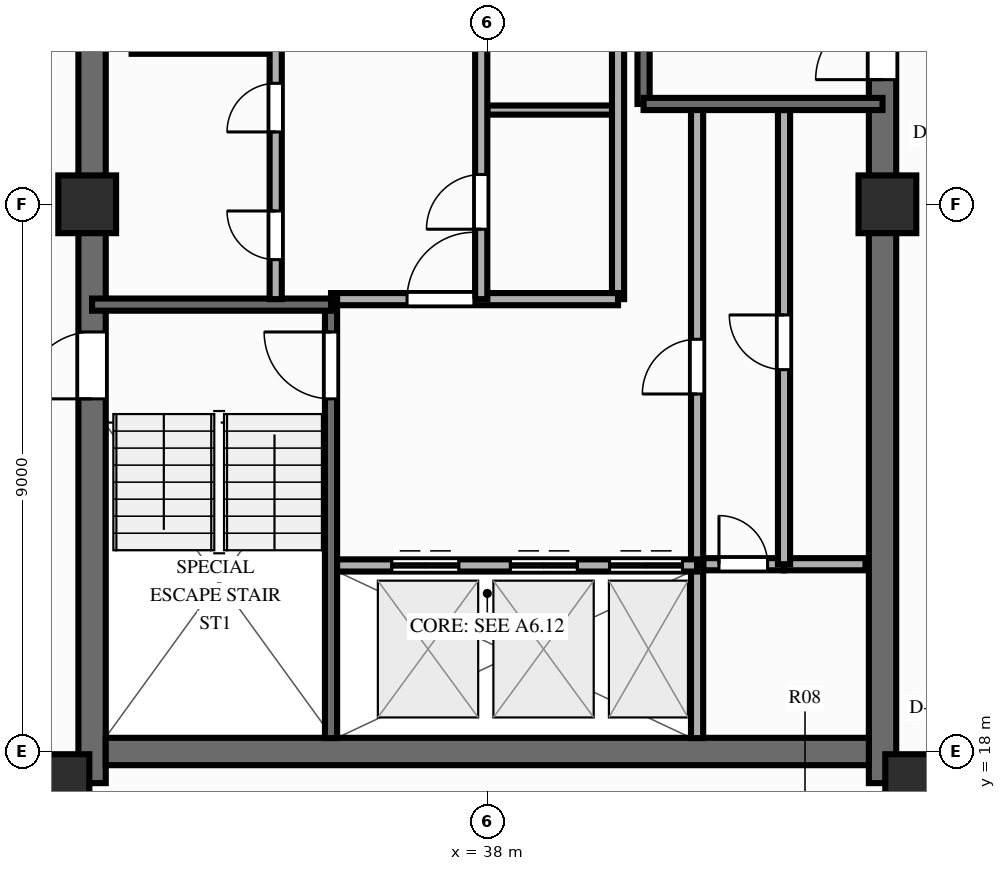
"""IFC4 building model, lengths in metres.
Left out: names, types, materials, properties, quantities, classifications, styles, units other than length and angle.
Written with IfcOpenShell. Run it as: python <this file> out.ifc"""

import sys

from ifc_helpers import new_model, si_unit, direction, frame, frame_2d, origin, origin_2d, place, context, subcontext, project, spatial, rectangle, extrude, source, transform, mapped, element, fill, save


model = new_model("IFC4")
c1 = context("Model", 3, precision=1e-05, world=origin(), true_north=direction((0.0, 1.0)))
c2 = subcontext(c1, "Body", "Model", "MODEL_VIEW")
j1 = project(units=[si_unit("LENGTHUNIT", "METRE"), si_unit("PLANEANGLEUNIT", "RADIAN")], contexts=[c1])
p1 = place(None, origin())
s1 = spatial("IfcSite", under=j1, at=p1, CompositionType="ELEMENT")
p2 = place(p1, origin())
s2 = spatial("IfcBuilding", under=s1, at=p2, CompositionType="ELEMENT")
p3 = place(p2, frame((0.0, 0.0, 243.0)))
s3 = spatial("IfcBuildingStorey", under=s2, at=p3, CompositionType="ELEMENT", Elevation=243.0)
p4 = place(p3, frame((31.5, 17.48, 0.0), z_axis=(0.0, 0.0, 1.0), x_axis=(0.0, 1.0, 0.0)))
e1 = element("IfcWall", 1, at=p4, inside=s3, PredefinedType="SHEAR", context=c2, shape_type="SweptSolid", body=[
    extrude(rectangle(XDim=19.04, YDim=0.45, at=frame_2d((9.52, 0.0))), origin(), (0.0, 0.0, 1.0), 3.0),
])
p5 = place(p4, frame((6.32, 0.0, 0.0)))
e2 = element("IfcOpeningElement", 2, at=p5, cuts=e1, PredefinedType="OPENING", context=c2, shape_type="SweptSolid", body=[
    extrude(rectangle(XDim=1.1, YDim=2.15, at=frame_2d((0.55, 1.075))), frame((0.0, 0.237, 0.0), z_axis=(0.0, -1.0, 0.0), x_axis=(1.0, 0.0, 0.0)), (0.0, 0.0, 1.0), 0.474),
])
p6 = place(p3, frame((44.5, 17.48, 0.0), z_axis=(0.0, 0.0, 1.0), x_axis=(0.0, 1.0, 0.0)))
e3 = element("IfcWall", 3, at=p6, inside=s3, PredefinedType="SHEAR", context=c2, shape_type="SweptSolid", body=[
    extrude(rectangle(XDim=19.04, YDim=0.45, at=frame_2d((9.52, 0.0))), origin(), (0.0, 0.0, 1.0), 3.0),
])
p7 = place(p6, frame((12.67, 0.0, 0.0), z_axis=(0.0, 0.0, 1.0), x_axis=(-1.0, 0.0, 0.0)))
e4 = element("IfcOpeningElement", 4, at=p7, cuts=e3, PredefinedType="OPENING", context=c2, shape_type="SweptSolid", body=[
    extrude(rectangle(XDim=1.1, YDim=2.15, at=frame_2d((0.55, 1.075))), frame((0.0, 0.237, 0.0), z_axis=(0.0, -1.0, 0.0), x_axis=(1.0, 0.0, 0.0)), (0.0, 0.0, 1.0), 0.474),
])
p8 = place(p3, frame((31.725, 18.0, 0.0), z_axis=(0.0, 0.0, 1.0), x_axis=(1.0, 0.0, 0.0)))
e5 = element("IfcWall", 5, at=p8, inside=s3, PredefinedType="SHEAR", context=c2, shape_type="SweptSolid", body=[
    extrude(rectangle(XDim=12.55, YDim=0.45, at=frame_2d((6.275, 0.0))), origin(), (0.0, 0.0, 1.0), 3.0),
])
m1 = source(origin(), c2, "Body", "SweptSolid", [
    extrude(rectangle(XDim=0.95, YDim=0.95, at=origin_2d()), origin(), (0.0, 0.0, 1.0), 3.0),
])
for number, where, z_axis, x_axis in (
    (6, (30.98, 17.48, 0.0), (0.0, 0.0, 1.0), (1.0, 0.0, 0.0)),
    (7, (45.02, 17.48, 0.0), (0.0, 0.0, 1.0), (1.0, 0.0, 0.0)),
    (8, (31.42, 27.0, 0.0), (0.0, 0.0, 1.0), (1.0, 0.0, 0.0)),
    (9, (44.58, 27.0, 0.0), (0.0, 0.0, 1.0), (1.0, 0.0, 0.0)),
):
    element("IfcColumn", number, at=place(p3, frame(where, z_axis=z_axis, x_axis=x_axis)), inside=s3, PredefinedType="COLUMN", context=c2, shape_type="MappedRepresentation", body=[
        mapped(m1, transform((0.0, 0.0, 0.0), scale=1.0)),
    ])
p9 = place(p3, frame((32.15, 29.55, 0.0), z_axis=(0.0, 0.0, 1.0), x_axis=(1.0, 0.0, 0.0)))
e10 = element("IfcWall", 10, at=p9, inside=s3, PredefinedType="PARTITIONING", context=c2, shape_type="SweptSolid", body=[
    extrude(rectangle(XDim=2.27, YDim=0.15, at=frame_2d((1.135, 0.0))), origin(), (0.0, 0.0, 1.0), 2.79),
])
p10 = place(p3, frame((38.0, 28.55, 0.0), z_axis=(0.0, 0.0, 1.0), x_axis=(1.0, 0.0, 0.0)))
e11 = element("IfcWall", 11, at=p10, inside=s3, PredefinedType="PARTITIONING", context=c2, shape_type="SweptSolid", body=[
    extrude(rectangle(XDim=2.2, YDim=0.15, at=frame_2d((1.1, 0.0))), origin(), (0.0, 0.0, 1.0), 2.14),
])
p11 = place(p3, frame((41.55, 21.08, 0.0), z_axis=(0.0, 0.0, 1.0), x_axis=(1.0, 0.0, 0.0)))
e12 = element("IfcWall", 12, at=p11, inside=s3, PredefinedType="PARTITIONING", context=c2, shape_type="SweptSolid", body=[
    extrude(rectangle(XDim=1.33, YDim=0.2, at=frame_2d((0.665, 0.0))), origin(), (0.0, 0.0, 1.0), 2.79),
])
p12 = place(p11, frame((0.26, 0.0, 0.0)))
e13 = element("IfcOpeningElement", 13, at=p12, cuts=e12, PredefinedType="OPENING", context=c2, shape_type="SweptSolid", body=[
    extrude(rectangle(XDim=0.8, YDim=2.05, at=frame_2d((0.4, 1.025))), frame((0.0, 0.112, 0.0), z_axis=(0.0, -1.0, 0.0), x_axis=(1.0, 0.0, 0.0)), (0.0, 0.0, 1.0), 0.224),
])
p13 = place(p3, frame((42.88, 21.08, 0.0), z_axis=(0.0, 0.0, 1.0), x_axis=(1.0, 0.0, 0.0)))
e14 = element("IfcWall", 14, at=p13, inside=s3, PredefinedType="PARTITIONING", context=c2, shape_type="SweptSolid", body=[
    extrude(rectangle(XDim=1.34, YDim=0.2, at=frame_2d((0.67, 0.0))), origin(), (0.0, 0.0, 1.0), 2.79),
])
p14 = place(p3, frame((42.88, 21.08, 0.0), z_axis=(0.0, 0.0, 1.0), x_axis=(0.0, 1.0, 0.0)))
e15 = element("IfcWall", 15, at=p14, inside=s3, PredefinedType="PARTITIONING", context=c2, shape_type="SweptSolid", body=[
    extrude(rectangle(XDim=7.47, YDim=0.2, at=frame_2d((3.735, 0.0))), origin(), (0.0, 0.0, 1.0), 2.79),
])
p15 = place(p14, frame((3.2, 0.0, 0.0)))
e16 = element("IfcOpeningElement", 16, at=p15, cuts=e15, PredefinedType="OPENING", context=c2, shape_type="SweptSolid", body=[
    extrude(rectangle(XDim=0.9, YDim=2.1, at=frame_2d((0.45, 1.05))), frame((0.0, 0.112, 0.0), z_axis=(0.0, -1.0, 0.0), x_axis=(1.0, 0.0, 0.0)), (0.0, 0.0, 1.0), 0.224),
])
p16 = place(p3, frame((41.45, 18.22, 0.0), z_axis=(0.0, 0.0, 1.0), x_axis=(0.0, 1.0, 0.0)))
e17 = element("IfcWall", 17, at=p16, inside=s3, PredefinedType="PARTITIONING", context=c2, shape_type="SweptSolid", body=[
    extrude(rectangle(XDim=2.86, YDim=0.2, at=frame_2d((1.43, 0.0))), origin(), (0.0, 0.0, 1.0), 2.79),
])
p17 = place(p3, frame((41.45, 21.08, 0.0), z_axis=(0.0, 0.0, 1.0), x_axis=(0.0, 1.0, 0.0)))
e18 = element("IfcWall", 18, at=p17, inside=s3, PredefinedType="PARTITIONING", context=c2, shape_type="SweptSolid", body=[
    extrude(rectangle(XDim=7.52, YDim=0.2, at=frame_2d((3.76, 0.0))), origin(), (0.0, 0.0, 1.0), 2.79),
])
p18 = place(p17, frame((2.8, 0.0, 0.0)))
e19 = element("IfcOpeningElement", 19, at=p18, cuts=e18, PredefinedType="OPENING", context=c2, shape_type="SweptSolid", body=[
    extrude(rectangle(XDim=0.9, YDim=2.1, at=frame_2d((0.45, 1.05))), frame((0.0, 0.112, 0.0), z_axis=(0.0, -1.0, 0.0), x_axis=(1.0, 0.0, 0.0)), (0.0, 0.0, 1.0), 0.224),
])
p19 = place(p3, frame((40.15, 25.44, 0.0), z_axis=(0.0, 0.0, 1.0), x_axis=(0.0, 1.0, 0.0)))
e20 = element("IfcWall", 20, at=p19, inside=s3, PredefinedType="PARTITIONING", context=c2, shape_type="SweptSolid", body=[
    extrude(rectangle(XDim=6.36, YDim=0.2, at=frame_2d((3.18, 0.0))), origin(), (0.0, 0.0, 1.0), 2.79),
])
p20 = place(p3, frame((35.43, 21.06, 0.0), z_axis=(0.0, 0.0, 1.0), x_axis=(1.0, 0.0, 0.0)))
e21 = element("IfcWall", 21, at=p20, inside=s3, PredefinedType="PARTITIONING", context=c2, shape_type="SweptSolid", body=[
    extrude(rectangle(XDim=6.02, YDim=0.2, at=frame_2d((3.01, 0.0))), origin(), (0.0, 0.0, 1.0), 2.79),
])
p21 = place(p20, frame((1.0, 0.0, 0.0)))
e22 = element("IfcOpeningElement", 22, at=p21, cuts=e21, PredefinedType="OPENING", context=c2, shape_type="SweptSolid", body=[
    extrude(rectangle(XDim=1.1, YDim=2.15, at=frame_2d((0.55, 1.075))), frame((0.0, 0.112, 0.0), z_axis=(0.0, -1.0, 0.0), x_axis=(1.0, 0.0, 0.0)), (0.0, 0.0, 1.0), 0.224),
])
p22 = place(p20, frame((2.95, 0.0, 0.0)))
e23 = element("IfcOpeningElement", 23, at=p22, cuts=e21, PredefinedType="OPENING", context=c2, shape_type="SweptSolid", body=[
    extrude(rectangle(XDim=1.1, YDim=2.15, at=frame_2d((0.55, 1.075))), frame((0.0, 0.112, 0.0), z_axis=(0.0, -1.0, 0.0), x_axis=(1.0, 0.0, 0.0)), (0.0, 0.0, 1.0), 0.224),
])
p23 = place(p20, frame((4.58, 0.0, 0.0)))
e24 = element("IfcOpeningElement", 24, at=p23, cuts=e21, PredefinedType="OPENING", context=c2, shape_type="SweptSolid", body=[
    extrude(rectangle(XDim=1.2, YDim=2.15, at=frame_2d((0.6, 1.075))), frame((0.0, 0.112, 0.0), z_axis=(0.0, -1.0, 0.0), x_axis=(1.0, 0.0, 0.0)), (0.0, 0.0, 1.0), 0.224),
])
p24 = place(p3, frame((35.43, 25.44, 0.0), z_axis=(0.0, 0.0, 1.0), x_axis=(1.0, 0.0, 0.0)))
e25 = element("IfcWall", 25, at=p24, inside=s3, PredefinedType="PARTITIONING", context=c2, shape_type="SweptSolid", body=[
    extrude(rectangle(XDim=4.72, YDim=0.2, at=frame_2d((2.36, 0.0))), origin(), (0.0, 0.0, 1.0), 2.79),
])
p25 = place(p24, frame((1.25, 0.0, 0.0)))
e26 = element("IfcOpeningElement", 26, at=p25, cuts=e25, PredefinedType="OPENING", context=c2, shape_type="SweptSolid", body=[
    extrude(rectangle(XDim=1.1, YDim=2.15, at=frame_2d((0.55, 1.075))), frame((0.0, 0.112, 0.0), z_axis=(0.0, -1.0, 0.0), x_axis=(1.0, 0.0, 0.0)), (0.0, 0.0, 1.0), 0.224),
])
p26 = place(p3, frame((35.43, 18.22, 0.0), z_axis=(0.0, 0.0, 1.0), x_axis=(0.0, 1.0, 0.0)))
e27 = element("IfcWall", 27, at=p26, inside=s3, PredefinedType="SOLIDWALL", context=c2, shape_type="SweptSolid", body=[
    extrude(rectangle(XDim=7.22, YDim=0.2, at=frame_2d((3.61, 0.0))), origin(), (0.0, 0.0, 1.0), 2.79),
])
p27 = place(p26, frame((6.68, 0.0, 0.0), z_axis=(0.0, 0.0, 1.0), x_axis=(-1.0, 0.0, 0.0)))
e28 = element("IfcOpeningElement", 28, at=p27, cuts=e27, PredefinedType="OPENING", context=c2, shape_type="SweptSolid", body=[
    extrude(rectangle(XDim=1.1, YDim=2.15, at=frame_2d((0.55, 1.075))), frame((0.0, 0.112, 0.0), z_axis=(0.0, -1.0, 0.0), x_axis=(1.0, 0.0, 0.0)), (0.0, 0.0, 1.0), 0.224),
])
p28 = place(p3, frame((31.5, 25.35, 0.0), z_axis=(0.0, 0.0, 1.0), x_axis=(1.0, 0.0, 0.0)))
e29 = element("IfcWall", 29, at=p28, inside=s3, PredefinedType="SOLIDWALL", context=c2, shape_type="SweptSolid", body=[
    extrude(rectangle(XDim=3.93, YDim=0.2, at=frame_2d((1.965, 0.0))), origin(), (0.0, 0.0, 1.0), 2.79),
])
p29 = place(p3, frame((40.57, 28.65, 0.0), z_axis=(0.0, 0.0, 1.0), x_axis=(0.0, 1.0, 0.0)))
e30 = element("IfcWall", 30, at=p29, inside=s3, PredefinedType="SOLIDWALL", context=c2, shape_type="SweptSolid", body=[
    extrude(rectangle(XDim=7.05, YDim=0.2, at=frame_2d((3.525, 0.0))), origin(), (0.0, 0.0, 1.0), 2.79),
])
p30 = place(p3, frame((40.57, 28.65, 0.0), z_axis=(0.0, 0.0, 1.0), x_axis=(1.0, 0.0, 0.0)))
e31 = element("IfcWall", 31, at=p30, inside=s3, PredefinedType="SOLIDWALL", context=c2, shape_type="SweptSolid", body=[
    extrude(rectangle(XDim=3.93, YDim=0.2, at=frame_2d((1.965, 0.0))), origin(), (0.0, 0.0, 1.0), 2.79),
])
p31 = place(p3, frame((34.52, 25.44, 0.0), z_axis=(0.0, 0.0, 1.0), x_axis=(0.0, 1.0, 0.0)))
e32 = element("IfcWall", 32, at=p31, inside=s3, PredefinedType="PARTITIONING", context=c2, shape_type="SweptSolid", body=[
    extrude(rectangle(XDim=10.34, YDim=0.2, at=frame_2d((5.17, 0.0))), origin(), (0.0, 0.0, 1.0), 2.79),
])
p32 = place(p31, frame((0.65, 0.0, 0.0)))
e33 = element("IfcOpeningElement", 33, at=p32, cuts=e32, PredefinedType="OPENING", context=c2, shape_type="SweptSolid", body=[
    extrude(rectangle(XDim=0.8, YDim=2.05, at=frame_2d((0.4, 1.025))), frame((0.0, 0.112, 0.0), z_axis=(0.0, -1.0, 0.0), x_axis=(1.0, 0.0, 0.0)), (0.0, 0.0, 1.0), 0.224),
])
p33 = place(p31, frame((2.75, 0.0, 0.0)))
e34 = element("IfcOpeningElement", 34, at=p33, cuts=e32, PredefinedType="OPENING", context=c2, shape_type="SweptSolid", body=[
    extrude(rectangle(XDim=0.8, YDim=2.05, at=frame_2d((0.4, 1.025))), frame((0.0, 0.112, 0.0), z_axis=(0.0, -1.0, 0.0), x_axis=(1.0, 0.0, 0.0)), (0.0, 0.0, 1.0), 0.224),
])
p34 = place(p31, frame((4.95, 0.0, 0.0)))
e35 = element("IfcOpeningElement", 35, at=p34, cuts=e32, PredefinedType="OPENING", context=c2, shape_type="SweptSolid", body=[
    extrude(rectangle(XDim=0.8, YDim=2.05, at=frame_2d((0.4, 1.025))), frame((0.0, 0.112, 0.0), z_axis=(0.0, -1.0, 0.0), x_axis=(1.0, 0.0, 0.0)), (0.0, 0.0, 1.0), 0.224),
])
p35 = place(p31, frame((7.01, 0.0, 0.0)))
e36 = element("IfcOpeningElement", 36, at=p35, cuts=e32, PredefinedType="OPENING", context=c2, shape_type="SweptSolid", body=[
    extrude(rectangle(XDim=1.0, YDim=2.15, at=frame_2d((0.5, 1.075))), frame((0.0, 0.112, 0.0), z_axis=(0.0, -1.0, 0.0), x_axis=(1.0, 0.0, 0.0)), (0.0, 0.0, 1.0), 0.224),
])
p36 = place(p31, frame((8.76, 0.0, 0.0)))
e37 = element("IfcOpeningElement", 37, at=p36, cuts=e32, PredefinedType="OPENING", context=c2, shape_type="SweptSolid", body=[
    extrude(rectangle(XDim=1.0, YDim=2.15, at=frame_2d((0.5, 1.075))), frame((0.0, 0.112, 0.0), z_axis=(0.0, -1.0, 0.0), x_axis=(1.0, 0.0, 0.0)), (0.0, 0.0, 1.0), 0.224),
])
p37 = place(p3, frame((37.9, 25.44, 0.0), z_axis=(0.0, 0.0, 1.0), x_axis=(0.0, 1.0, 0.0)))
e38 = element("IfcWall", 38, at=p37, inside=s3, PredefinedType="PARTITIONING", context=c2, shape_type="SweptSolid", body=[
    extrude(rectangle(XDim=10.34, YDim=0.2, at=frame_2d((5.17, 0.0))), origin(), (0.0, 0.0, 1.0), 2.79),
])
p38 = place(p37, frame((1.15, 0.0, 0.0)))
e39 = element("IfcOpeningElement", 39, at=p38, cuts=e38, PredefinedType="OPENING", context=c2, shape_type="SweptSolid", body=[
    extrude(rectangle(XDim=0.9, YDim=2.1, at=frame_2d((0.45, 1.05))), frame((0.0, 0.112, 0.0), z_axis=(0.0, -1.0, 0.0), x_axis=(1.0, 0.0, 0.0)), (0.0, 0.0, 1.0), 0.224),
])
p39 = place(p37, frame((4.2, 0.0, 0.0)))
e40 = element("IfcOpeningElement", 40, at=p39, cuts=e38, PredefinedType="OPENING", context=c2, shape_type="SweptSolid", body=[
    extrude(rectangle(XDim=0.9, YDim=2.1, at=frame_2d((0.45, 1.05))), frame((0.0, 0.112, 0.0), z_axis=(0.0, -1.0, 0.0), x_axis=(1.0, 0.0, 0.0)), (0.0, 0.0, 1.0), 0.224),
])
p40 = place(p37, frame((6.86, 0.0, 0.0)))
e41 = element("IfcOpeningElement", 41, at=p40, cuts=e38, PredefinedType="OPENING", context=c2, shape_type="SweptSolid", body=[
    extrude(rectangle(XDim=1.0, YDim=2.15, at=frame_2d((0.5, 1.075))), frame((0.0, 0.112, 0.0), z_axis=(0.0, -1.0, 0.0), x_axis=(1.0, 0.0, 0.0)), (0.0, 0.0, 1.0), 0.224),
])
p41 = place(p37, frame((8.71, 0.0, 0.0)))
e42 = element("IfcOpeningElement", 42, at=p41, cuts=e38, PredefinedType="OPENING", context=c2, shape_type="SweptSolid", body=[
    extrude(rectangle(XDim=1.0, YDim=2.15, at=frame_2d((0.5, 1.075))), frame((0.0, 0.112, 0.0), z_axis=(0.0, -1.0, 0.0), x_axis=(1.0, 0.0, 0.0)), (0.0, 0.0, 1.0), 0.224),
])
m2 = source(origin(), c2, "Body", "SweptSolid", [
    extrude(rectangle(XDim=1.1, YDim=2.15, at=frame_2d((0.55, 1.075))), frame((0.0, 0.025, 0.0), z_axis=(0.0, -1.0, 0.0), x_axis=(1.0, 0.0, 0.0)), (0.0, 0.0, 1.0), 0.05),
])
p42 = place(p5, origin())
e43 = element("IfcDoor", 43, at=p42, inside=s3, OperationType="SINGLE_SWING_LEFT", PredefinedType="DOOR", context=c2, shape_type="MappedRepresentation", body=[
    mapped(m2, transform((0.0, 0.0, 0.0), scale=1.0)),
])
fill(e2, e43)
p43 = place(p7, origin())
e44 = element("IfcDoor", 44, at=p43, inside=s3, OperationType="SINGLE_SWING_RIGHT", PredefinedType="DOOR", context=c2, shape_type="MappedRepresentation", body=[
    mapped(m2, transform((0.0, 0.0, 0.0), scale=1.0)),
])
fill(e4, e44)
m3 = source(origin(), c2, "Body", "SweptSolid", [
    extrude(rectangle(XDim=0.8, YDim=2.05, at=frame_2d((0.4, 1.025))), frame((0.0, 0.025, 0.0), z_axis=(0.0, -1.0, 0.0), x_axis=(1.0, 0.0, 0.0)), (0.0, 0.0, 1.0), 0.05),
])
p44 = place(p12, origin())
e45 = element("IfcDoor", 45, at=p44, inside=s3, OperationType="SINGLE_SWING_LEFT", PredefinedType="DOOR", context=c2, shape_type="MappedRepresentation", body=[
    mapped(m3, transform((0.0, 0.0, 0.0), scale=1.0)),
])
fill(e13, e45)
m4 = source(origin(), c2, "Body", "SweptSolid", [
    extrude(rectangle(XDim=0.9, YDim=2.1, at=frame_2d((0.45, 1.05))), frame((0.0, 0.025, 0.0), z_axis=(0.0, -1.0, 0.0), x_axis=(1.0, 0.0, 0.0)), (0.0, 0.0, 1.0), 0.05),
])
p45 = place(p15, origin())
e46 = element("IfcDoor", 46, at=p45, inside=s3, OperationType="SINGLE_SWING_RIGHT", PredefinedType="DOOR", context=c2, shape_type="MappedRepresentation", body=[
    mapped(m4, transform((0.0, 0.0, 0.0), scale=1.0)),
])
fill(e16, e46)
p46 = place(p18, origin())
e47 = element("IfcDoor", 47, at=p46, inside=s3, OperationType="SINGLE_SWING_LEFT", PredefinedType="DOOR", context=c2, shape_type="MappedRepresentation", body=[
    mapped(m4, transform((0.0, 0.0, 0.0), scale=1.0)),
])
fill(e19, e47)
p47 = place(p21, origin())
e48 = element("IfcDoor", 48, at=p47, inside=s3, OperationType="DOUBLE_DOOR_SLIDING", PredefinedType="DOOR", context=c2, shape_type="MappedRepresentation", body=[
    mapped(m2, transform((0.0, 0.0, 0.0), scale=1.0)),
])
fill(e22, e48)
p48 = place(p22, origin())
e49 = element("IfcDoor", 49, at=p48, inside=s3, OperationType="DOUBLE_DOOR_SLIDING", PredefinedType="DOOR", context=c2, shape_type="MappedRepresentation", body=[
    mapped(m2, transform((0.0, 0.0, 0.0), scale=1.0)),
])
fill(e23, e49)
m5 = source(origin(), c2, "Body", "SweptSolid", [
    extrude(rectangle(XDim=1.2, YDim=2.15, at=frame_2d((0.6, 1.075))), frame((0.0, 0.025, 0.0), z_axis=(0.0, -1.0, 0.0), x_axis=(1.0, 0.0, 0.0)), (0.0, 0.0, 1.0), 0.05),
])
p49 = place(p23, origin())
e50 = element("IfcDoor", 50, at=p49, inside=s3, OperationType="DOUBLE_DOOR_SLIDING", PredefinedType="DOOR", context=c2, shape_type="MappedRepresentation", body=[
    mapped(m5, transform((0.0, 0.0, 0.0), scale=1.0)),
])
fill(e24, e50)
p50 = place(p25, origin())
e51 = element("IfcDoor", 51, at=p50, inside=s3, OperationType="SINGLE_SWING_RIGHT", PredefinedType="DOOR", context=c2, shape_type="MappedRepresentation", body=[
    mapped(m2, transform((0.0, 0.0, 0.0), scale=1.0)),
])
fill(e26, e51)
p51 = place(p27, origin())
e52 = element("IfcDoor", 52, at=p51, inside=s3, OperationType="SINGLE_SWING_LEFT", PredefinedType="DOOR", context=c2, shape_type="MappedRepresentation", body=[
    mapped(m2, transform((0.0, 0.0, 0.0), scale=1.0)),
])
fill(e28, e52)
p52 = place(p32, origin())
e53 = element("IfcDoor", 53, at=p52, inside=s3, OperationType="SINGLE_SWING_RIGHT", PredefinedType="DOOR", context=c2, shape_type="MappedRepresentation", body=[
    mapped(m3, transform((0.0, 0.0, 0.0), scale=1.0)),
])
fill(e33, e53)
p53 = place(p33, origin())
e54 = element("IfcDoor", 54, at=p53, inside=s3, OperationType="SINGLE_SWING_LEFT", PredefinedType="DOOR", context=c2, shape_type="MappedRepresentation", body=[
    mapped(m3, transform((0.0, 0.0, 0.0), scale=1.0)),
])
fill(e34, e54)
p54 = place(p38, origin())
e55 = element("IfcDoor", 55, at=p54, inside=s3, OperationType="SINGLE_SWING_LEFT", PredefinedType="DOOR", context=c2, shape_type="MappedRepresentation", body=[
    mapped(m4, transform((0.0, 0.0, 0.0), scale=1.0)),
])
fill(e39, e55)
save(model, sys.argv[1])
